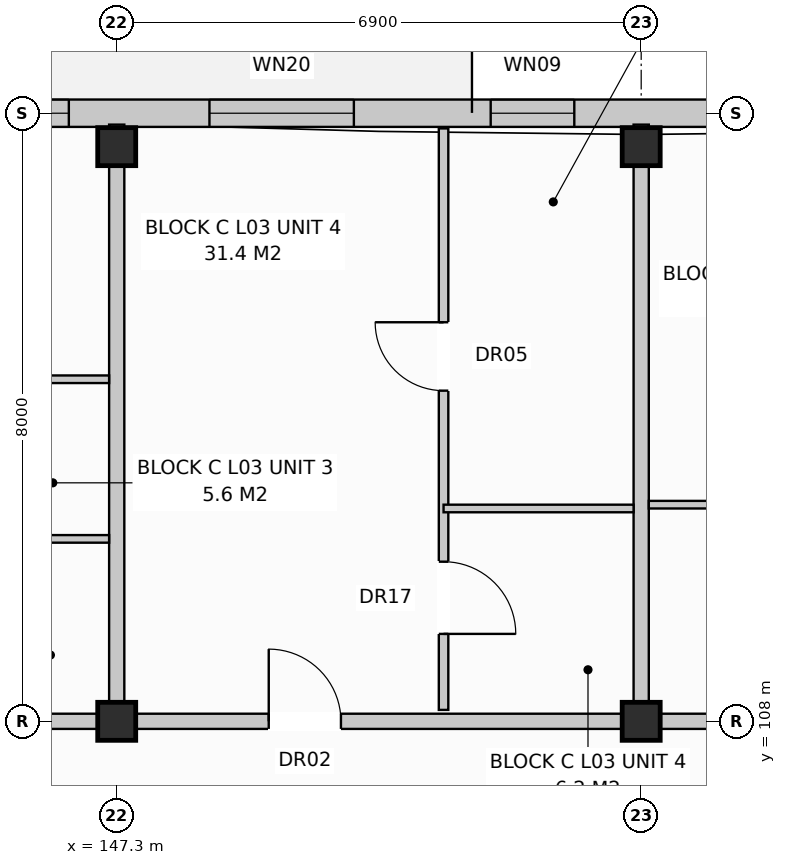
"""IFC4 building model, lengths in metres.
Left out: names, types, materials, properties, quantities, classifications, styles, units other than length and angle.
Written with IfcOpenShell. Run it as: python <this file> out.ifc"""

import sys

from ifc_helpers import new_model, si_unit, direction, frame, frame_2d, origin, origin_with_axes, origin_2d, place, context, subcontext, project, spatial, rectangle, extrude, element, fill, save


model = new_model("IFC4")
c1 = context("Model", 3, precision=1e-05, world=origin(), true_north=direction((0.0, 1.0)))
c2 = subcontext(c1, "Body", "Model", "MODEL_VIEW")
j1 = project(units=[si_unit("LENGTHUNIT", "METRE"), si_unit("PLANEANGLEUNIT", "RADIAN")], contexts=[c1])
p1 = place(None, origin())
s1 = spatial("IfcSite", under=j1, at=p1, CompositionType="ELEMENT")
p2 = place(p1, origin())
s2 = spatial("IfcBuilding", under=s1, at=p2, CompositionType="ELEMENT")
p3 = place(p2, frame((0.0, 0.0, 11.2)))
s3 = spatial("IfcBuildingStorey", under=s2, at=p3, CompositionType="ELEMENT", Elevation=11.2)
for number, where, z_axis, x_axis in (
    (1, (147.3, 108.0, 0.0), (0.0, 0.0, 1.0), (1.0, 0.0, 0.0)),
    (2, (147.3, 115.56, 0.0), (0.0, 0.0, 1.0), (1.0, 0.0, 0.0)),
    (3, (154.2, 108.0, 0.0), (0.0, 0.0, 1.0), (1.0, 0.0, 0.0)),
    (4, (154.2, 115.56, 0.0), (0.0, 0.0, 1.0), (1.0, 0.0, 0.0)),
):
    element("IfcColumn", number, at=place(p3, frame(where, z_axis=z_axis, x_axis=x_axis)), inside=s3, PredefinedType="COLUMN", context=c2, shape_type="SweptSolid", body=[
        extrude(rectangle(XDim=0.5, YDim=0.5, at=origin_2d()), origin(), (0.0, 0.0, 1.0), 3.2),
    ])
p4 = place(p3, frame((112.97, 116.0, 0.0), z_axis=(0.0, 0.0, 1.0), x_axis=(1.0, 0.0, 0.0)))
e5 = element("IfcWall", 5, at=p4, inside=s3, PredefinedType="STANDARD", context=c2, shape_type="SweptSolid", body=[
    extrude(rectangle(XDim=54.86, YDim=0.36, at=frame_2d((27.43, 0.0))), origin(), (0.0, 0.0, 1.0), 2.94),
])
p5 = place(p4, frame((2.497, 0.0, 0.0)))
e6 = element("IfcOpeningElement", 6, at=p5, cuts=e5, PredefinedType="OPENING", context=c2, shape_type="SweptSolid", body=[
    extrude(rectangle(XDim=0.95, YDim=2.1, at=frame_2d((0.475, 1.05))), frame((0.0, 0.192, 0.0), z_axis=(0.0, -1.0, 0.0), x_axis=(1.0, 0.0, 0.0)), (0.0, 0.0, 1.0), 0.384),
])
p6 = place(p4, frame((17.026, 0.0, 0.0)))
e7 = element("IfcOpeningElement", 7, at=p6, cuts=e5, PredefinedType="OPENING", context=c2, shape_type="SweptSolid", body=[
    extrude(rectangle(XDim=0.95, YDim=2.1, at=frame_2d((0.475, 1.05))), frame((0.0, 0.192, 0.0), z_axis=(0.0, -1.0, 0.0), x_axis=(1.0, 0.0, 0.0)), (0.0, 0.0, 1.0), 0.384),
])
p7 = place(p4, frame((30.126, 0.0, 0.0)))
e8 = element("IfcOpeningElement", 8, at=p7, cuts=e5, PredefinedType="OPENING", context=c2, shape_type="SweptSolid", body=[
    extrude(rectangle(XDim=0.95, YDim=2.1, at=frame_2d((0.475, 1.05))), frame((0.0, 0.192, 0.0), z_axis=(0.0, -1.0, 0.0), x_axis=(1.0, 0.0, 0.0)), (0.0, 0.0, 1.0), 0.384),
])
p8 = place(p4, frame((44.226, 0.0, 0.0)))
e9 = element("IfcOpeningElement", 9, at=p8, cuts=e5, PredefinedType="OPENING", context=c2, shape_type="SweptSolid", body=[
    extrude(rectangle(XDim=0.95, YDim=2.1, at=frame_2d((0.475, 1.05))), frame((0.0, 0.192, 0.0), z_axis=(0.0, -1.0, 0.0), x_axis=(1.0, 0.0, 0.0)), (0.0, 0.0, 1.0), 0.384),
])
p9 = place(p4, frame((0.645, 0.0, 0.85)))
e10 = element("IfcOpeningElement", 10, at=p9, cuts=e5, PredefinedType="OPENING", context=c2, shape_type="SweptSolid", body=[
    extrude(rectangle(XDim=1.55, YDim=1.55, at=frame_2d((0.775, 0.775))), frame((0.0, 0.192, 0.0), z_axis=(0.0, -1.0, 0.0), x_axis=(1.0, 0.0, 0.0)), (0.0, 0.0, 1.0), 0.384),
])
p10 = place(p4, frame((4.3, 0.0, 0.8)))
e11 = element("IfcOpeningElement", 11, at=p10, cuts=e5, PredefinedType="OPENING", context=c2, shape_type="SweptSolid", body=[
    extrude(rectangle(XDim=1.8, YDim=1.7, at=frame_2d((0.9, 0.85))), frame((0.0, 0.192, 0.0), z_axis=(0.0, -1.0, 0.0), x_axis=(1.0, 0.0, 0.0)), (0.0, 0.0, 1.0), 0.384),
])
p11 = place(p4, frame((9.35, 0.0, 0.72)))
e12 = element("IfcOpeningElement", 12, at=p11, cuts=e5, PredefinedType="OPENING", context=c2, shape_type="SweptSolid", body=[
    extrude(rectangle(XDim=1.1, YDim=1.5, at=frame_2d((0.55, 0.75))), frame((0.0, 0.192, 0.0), z_axis=(0.0, -1.0, 0.0), x_axis=(1.0, 0.0, 0.0)), (0.0, 0.0, 1.0), 0.384),
])
p12 = place(p4, frame((15.05, 0.0, 0.72)))
e13 = element("IfcOpeningElement", 13, at=p12, cuts=e5, PredefinedType="OPENING", context=c2, shape_type="SweptSolid", body=[
    extrude(rectangle(XDim=1.1, YDim=1.5, at=frame_2d((0.55, 0.75))), frame((0.0, 0.192, 0.0), z_axis=(0.0, -1.0, 0.0), x_axis=(1.0, 0.0, 0.0)), (0.0, 0.0, 1.0), 0.384),
])
p13 = place(p4, frame((21.1, 0.0, 0.8)))
e14 = element("IfcOpeningElement", 14, at=p13, cuts=e5, PredefinedType="OPENING", context=c2, shape_type="SweptSolid", body=[
    extrude(rectangle(XDim=1.8, YDim=1.7, at=frame_2d((0.9, 0.85))), frame((0.0, 0.192, 0.0), z_axis=(0.0, -1.0, 0.0), x_axis=(1.0, 0.0, 0.0)), (0.0, 0.0, 1.0), 0.384),
])
p14 = place(p4, frame((24.85, 0.0, 0.72)))
e15 = element("IfcOpeningElement", 15, at=p14, cuts=e5, PredefinedType="OPENING", context=c2, shape_type="SweptSolid", body=[
    extrude(rectangle(XDim=1.1, YDim=1.5, at=frame_2d((0.55, 0.75))), frame((0.0, 0.192, 0.0), z_axis=(0.0, -1.0, 0.0), x_axis=(1.0, 0.0, 0.0)), (0.0, 0.0, 1.0), 0.384),
])
p15 = place(p4, frame((28.35, 0.0, 0.72)))
e16 = element("IfcOpeningElement", 16, at=p15, cuts=e5, PredefinedType="OPENING", context=c2, shape_type="SweptSolid", body=[
    extrude(rectangle(XDim=1.1, YDim=1.5, at=frame_2d((0.55, 0.75))), frame((0.0, 0.192, 0.0), z_axis=(0.0, -1.0, 0.0), x_axis=(1.0, 0.0, 0.0)), (0.0, 0.0, 1.0), 0.384),
])
p16 = place(p4, frame((31.9, 0.0, 0.8)))
e17 = element("IfcOpeningElement", 17, at=p16, cuts=e5, PredefinedType="OPENING", context=c2, shape_type="SweptSolid", body=[
    extrude(rectangle(XDim=1.8, YDim=1.7, at=frame_2d((0.9, 0.85))), frame((0.0, 0.192, 0.0), z_axis=(0.0, -1.0, 0.0), x_axis=(1.0, 0.0, 0.0)), (0.0, 0.0, 1.0), 0.384),
])
p17 = place(p4, frame((35.55, 0.0, 0.72)))
e18 = element("IfcOpeningElement", 18, at=p17, cuts=e5, PredefinedType="OPENING", context=c2, shape_type="SweptSolid", body=[
    extrude(rectangle(XDim=1.9, YDim=1.85, at=frame_2d((0.95, 0.925))), frame((0.0, 0.192, 0.0), z_axis=(0.0, -1.0, 0.0), x_axis=(1.0, 0.0, 0.0)), (0.0, 0.0, 1.0), 0.384),
])
p18 = place(p4, frame((39.25, 0.0, 0.72)))
e19 = element("IfcOpeningElement", 19, at=p18, cuts=e5, PredefinedType="OPENING", context=c2, shape_type="SweptSolid", body=[
    extrude(rectangle(XDim=1.1, YDim=1.5, at=frame_2d((0.55, 0.75))), frame((0.0, 0.192, 0.0), z_axis=(0.0, -1.0, 0.0), x_axis=(1.0, 0.0, 0.0)), (0.0, 0.0, 1.0), 0.384),
])
p19 = place(p4, frame((42.45, 0.0, 0.72)))
e20 = element("IfcOpeningElement", 20, at=p19, cuts=e5, PredefinedType="OPENING", context=c2, shape_type="SweptSolid", body=[
    extrude(rectangle(XDim=1.1, YDim=1.5, at=frame_2d((0.55, 0.75))), frame((0.0, 0.192, 0.0), z_axis=(0.0, -1.0, 0.0), x_axis=(1.0, 0.0, 0.0)), (0.0, 0.0, 1.0), 0.384),
])
p20 = place(p4, frame((45.75, 0.0, 0.72)))
e21 = element("IfcOpeningElement", 21, at=p20, cuts=e5, PredefinedType="OPENING", context=c2, shape_type="SweptSolid", body=[
    extrude(rectangle(XDim=1.9, YDim=1.85, at=frame_2d((0.95, 0.925))), frame((0.0, 0.192, 0.0), z_axis=(0.0, -1.0, 0.0), x_axis=(1.0, 0.0, 0.0)), (0.0, 0.0, 1.0), 0.384),
])
p21 = place(p4, frame((51.85, 0.0, 0.72)))
e22 = element("IfcOpeningElement", 22, at=p21, cuts=e5, PredefinedType="OPENING", context=c2, shape_type="SweptSolid", body=[
    extrude(rectangle(XDim=1.1, YDim=1.5, at=frame_2d((0.55, 0.75))), frame((0.0, 0.192, 0.0), z_axis=(0.0, -1.0, 0.0), x_axis=(1.0, 0.0, 0.0)), (0.0, 0.0, 1.0), 0.384),
])
p22 = place(p3, frame((147.3, 108.15, 0.0), z_axis=(0.0, 0.0, 1.0), x_axis=(0.0, 1.0, 0.0)))
e23 = element("IfcWall", 23, at=p22, inside=s3, PredefinedType="PARTITIONING", context=c2, shape_type="SweptSolid", body=[
    extrude(rectangle(XDim=7.7, YDim=0.2, at=frame_2d((3.85, 0.0))), origin(), (0.0, 0.0, 1.0), 2.94),
])
p23 = place(p3, frame((140.4, 108.0, 0.0), z_axis=(0.0, 0.0, 1.0), x_axis=(1.0, 0.0, 0.0)))
e24 = element("IfcWall", 24, at=p23, inside=s3, PredefinedType="PARTITIONING", context=c2, shape_type="SweptSolid", body=[
    extrude(rectangle(XDim=6.9, YDim=0.2, at=frame_2d((3.45, 0.0))), origin(), (0.0, 0.0, 1.0), 2.38),
])
p24 = place(p23, frame((2.0, 0.0, 0.0)))
e25 = element("IfcOpeningElement", 25, at=p24, cuts=e24, PredefinedType="OPENING", context=c2, shape_type="SweptSolid", body=[
    extrude(rectangle(XDim=0.95, YDim=2.15, at=frame_2d((0.475, 1.075))), frame((0.0, 0.112, 0.0), z_axis=(0.0, -1.0, 0.0), x_axis=(1.0, 0.0, 0.0)), (0.0, 0.0, 1.0), 0.224),
])
for number, where, z_axis, x_axis in (
    (26, (144.3, 110.4, 0.0), (0.0, 0.0, 1.0), (1.0, 0.0, 0.0)),
    (27, (144.3, 112.5, 0.0), (0.0, 0.0, 1.0), (1.0, 0.0, 0.0)),
):
    element("IfcWall", number, at=place(p3, frame(where, z_axis=z_axis, x_axis=x_axis)), inside=s3, PredefinedType="PARTITIONING", context=c2, shape_type="SweptSolid", body=[
        extrude(rectangle(XDim=2.9, YDim=0.1, at=frame_2d((1.45, 0.0))), origin(), (0.0, 0.0, 1.0), 2.94),
    ])
p25 = place(p3, frame((154.2, 108.15, 0.0), z_axis=(0.0, 0.0, 1.0), x_axis=(0.0, 1.0, 0.0)))
e28 = element("IfcWall", 28, at=p25, inside=s3, PredefinedType="PARTITIONING", context=c2, shape_type="SweptSolid", body=[
    extrude(rectangle(XDim=7.7, YDim=0.2, at=frame_2d((3.85, 0.0))), origin(), (0.0, 0.0, 1.0), 2.94),
])
p26 = place(p3, frame((147.3, 108.0, 0.0), z_axis=(0.0, 0.0, 1.0), x_axis=(1.0, 0.0, 0.0)))
e29 = element("IfcWall", 29, at=p26, inside=s3, PredefinedType="PARTITIONING", context=c2, shape_type="SweptSolid", body=[
    extrude(rectangle(XDim=6.9, YDim=0.2, at=frame_2d((3.45, 0.0))), origin(), (0.0, 0.0, 1.0), 2.38),
])
p27 = place(p26, frame((2.0, 0.0, 0.0)))
e30 = element("IfcOpeningElement", 30, at=p27, cuts=e29, PredefinedType="OPENING", context=c2, shape_type="SweptSolid", body=[
    extrude(rectangle(XDim=0.95, YDim=2.15, at=frame_2d((0.475, 1.075))), frame((0.0, 0.112, 0.0), z_axis=(0.0, -1.0, 0.0), x_axis=(1.0, 0.0, 0.0)), (0.0, 0.0, 1.0), 0.224),
])
p28 = place(p3, frame((151.6, 108.15, 0.0), z_axis=(0.0, 0.0, 1.0), x_axis=(0.0, 1.0, 0.0)))
e31 = element("IfcWall", 31, at=p28, inside=s3, PredefinedType="PARTITIONING", context=c2, shape_type="SweptSolid", body=[
    extrude(rectangle(XDim=7.65, YDim=0.125, at=frame_2d((3.825, 0.0))), origin(), (0.0, 0.0, 1.0), 2.94),
])
p29 = place(p28, frame((1.0, 0.0, 0.0)))
e32 = element("IfcOpeningElement", 32, at=p29, cuts=e31, PredefinedType="OPENING", context=c2, shape_type="SweptSolid", body=[
    extrude(rectangle(XDim=0.95, YDim=2.1, at=frame_2d((0.475, 1.05))), frame((0.0, 0.074, 0.0), z_axis=(0.0, -1.0, 0.0), x_axis=(1.0, 0.0, 0.0)), (0.0, 0.0, 1.0), 0.149),
])
p30 = place(p28, frame((4.2, 0.0, 0.0)))
e33 = element("IfcOpeningElement", 33, at=p30, cuts=e31, PredefinedType="OPENING", context=c2, shape_type="SweptSolid", body=[
    extrude(rectangle(XDim=0.9, YDim=2.1, at=frame_2d((0.45, 1.05))), frame((0.0, 0.074, 0.0), z_axis=(0.0, -1.0, 0.0), x_axis=(1.0, 0.0, 0.0)), (0.0, 0.0, 1.0), 0.149),
])
p31 = place(p3, frame((151.6, 110.8, 0.0), z_axis=(0.0, 0.0, 1.0), x_axis=(1.0, 0.0, 0.0)))
e34 = element("IfcWall", 34, at=p31, inside=s3, PredefinedType="PARTITIONING", context=c2, shape_type="SweptSolid", body=[
    extrude(rectangle(XDim=2.5, YDim=0.1, at=frame_2d((1.25, 0.0))), origin(), (0.0, 0.0, 1.0), 2.94),
])
p32 = place(p3, frame((154.2, 108.0, 0.0), z_axis=(0.0, 0.0, 1.0), x_axis=(1.0, 0.0, 0.0)))
e35 = element("IfcWall", 35, at=p32, inside=s3, PredefinedType="PARTITIONING", context=c2, shape_type="SweptSolid", body=[
    extrude(rectangle(XDim=13.8, YDim=0.2, at=frame_2d((6.9, 0.0))), origin(), (0.0, 0.0, 1.0), 2.38),
])
p33 = place(p32, frame((9.6, 0.0, 0.0)))
e36 = element("IfcOpeningElement", 36, at=p33, cuts=e35, PredefinedType="OPENING", context=c2, shape_type="SweptSolid", body=[
    extrude(rectangle(XDim=0.95, YDim=2.15, at=frame_2d((0.475, 1.075))), frame((0.0, 0.112, 0.0), z_axis=(0.0, -1.0, 0.0), x_axis=(1.0, 0.0, 0.0)), (0.0, 0.0, 1.0), 0.224),
])
p34 = place(p3, frame((154.3, 110.85, 0.0), z_axis=(0.0, 0.0, 1.0), x_axis=(1.0, 0.0, 0.0)))
e37 = element("IfcWall", 37, at=p34, inside=s3, PredefinedType="PARTITIONING", context=c2, shape_type="SweptSolid", body=[
    extrude(rectangle(XDim=8.6, YDim=0.1, at=frame_2d((4.3, 0.0))), origin(), (0.0, 0.0, 1.0), 2.94),
])
p35 = place(p34, frame((1.4, 0.0, 0.0)))
e38 = element("IfcOpeningElement", 38, at=p35, cuts=e37, PredefinedType="OPENING", context=c2, shape_type="SweptSolid", body=[
    extrude(rectangle(XDim=0.85, YDim=2.05, at=frame_2d((0.425, 1.025))), frame((0.0, 0.062, 0.0), z_axis=(0.0, -1.0, 0.0), x_axis=(1.0, 0.0, 0.0)), (0.0, 0.0, 1.0), 0.124),
])
p36 = place(p34, frame((4.65, 0.0, 0.0)))
e39 = element("IfcOpeningElement", 39, at=p36, cuts=e37, PredefinedType="OPENING", context=c2, shape_type="SweptSolid", body=[
    extrude(rectangle(XDim=0.85, YDim=2.05, at=frame_2d((0.425, 1.025))), frame((0.0, 0.062, 0.0), z_axis=(0.0, -1.0, 0.0), x_axis=(1.0, 0.0, 0.0)), (0.0, 0.0, 1.0), 0.124),
])
p37 = place(p34, frame((6.8, 0.0, 0.0)))
e40 = element("IfcOpeningElement", 40, at=p37, cuts=e37, PredefinedType="OPENING", context=c2, shape_type="SweptSolid", body=[
    extrude(rectangle(XDim=0.85, YDim=2.1, at=frame_2d((0.425, 1.05))), frame((0.0, 0.062, 0.0), z_axis=(0.0, -1.0, 0.0), x_axis=(1.0, 0.0, 0.0)), (0.0, 0.0, 1.0), 0.124),
])
p38 = place(p16, origin_with_axes())
e41 = element("IfcWindow", 41, at=p38, inside=s3, PartitioningType="SINGLE_PANEL", PredefinedType="WINDOW", context=c2, shape_type="SweptSolid", body=[
    extrude(rectangle(XDim=1.8, YDim=1.7, at=frame_2d((0.9, 0.85))), frame((0.0, 0.03, 0.0), z_axis=(0.0, -1.0, 0.0), x_axis=(1.0, 0.0, 0.0)), (0.0, 0.0, 1.0), 0.06),
])
fill(e17, e41)
p39 = place(p17, origin_with_axes())
e42 = element("IfcWindow", 42, at=p39, inside=s3, PartitioningType="SINGLE_PANEL", PredefinedType="WINDOW", context=c2, shape_type="SweptSolid", body=[
    extrude(rectangle(XDim=1.9, YDim=1.85, at=frame_2d((0.95, 0.925))), frame((0.0, 0.03, 0.0), z_axis=(0.0, -1.0, 0.0), x_axis=(1.0, 0.0, 0.0)), (0.0, 0.0, 1.0), 0.06),
])
fill(e18, e42)
p40 = place(p18, origin_with_axes())
e43 = element("IfcWindow", 43, at=p40, inside=s3, PartitioningType="SINGLE_PANEL", PredefinedType="WINDOW", context=c2, shape_type="SweptSolid", body=[
    extrude(rectangle(XDim=1.1, YDim=1.5, at=frame_2d((0.55, 0.75))), frame((0.0, 0.03, 0.0), z_axis=(0.0, -1.0, 0.0), x_axis=(1.0, 0.0, 0.0)), (0.0, 0.0, 1.0), 0.06),
])
fill(e19, e43)
p41 = place(p27, origin_with_axes())
e44 = element("IfcDoor", 44, at=p41, inside=s3, OperationType="SINGLE_SWING_LEFT", PredefinedType="DOOR", context=c2, shape_type="SweptSolid", body=[
    extrude(rectangle(XDim=0.95, YDim=2.15, at=frame_2d((0.475, 1.075))), frame((0.0, 0.025, 0.0), z_axis=(0.0, -1.0, 0.0), x_axis=(1.0, 0.0, 0.0)), (0.0, 0.0, 1.0), 0.05),
])
fill(e30, e44)
p42 = place(p29, frame((0.95, 0.0, 0.0), z_axis=(0.0, 0.0, 1.0), x_axis=(-1.0, 0.0, 0.0)))
e45 = element("IfcDoor", 45, at=p42, inside=s3, OperationType="SINGLE_SWING_LEFT", PredefinedType="DOOR", context=c2, shape_type="SweptSolid", body=[
    extrude(rectangle(XDim=0.95, YDim=2.1, at=frame_2d((0.475, 1.05))), frame((0.0, 0.025, 0.0), z_axis=(0.0, -1.0, 0.0), x_axis=(1.0, 0.0, 0.0)), (0.0, 0.0, 1.0), 0.05),
])
fill(e32, e45)
p43 = place(p30, origin_with_axes())
e46 = element("IfcDoor", 46, at=p43, inside=s3, OperationType="SINGLE_SWING_RIGHT", PredefinedType="DOOR", context=c2, shape_type="SweptSolid", body=[
    extrude(rectangle(XDim=0.9, YDim=2.1, at=frame_2d((0.45, 1.05))), frame((0.0, 0.025, 0.0), z_axis=(0.0, -1.0, 0.0), x_axis=(1.0, 0.0, 0.0)), (0.0, 0.0, 1.0), 0.05),
])
fill(e33, e46)
save(model, sys.argv[1])
